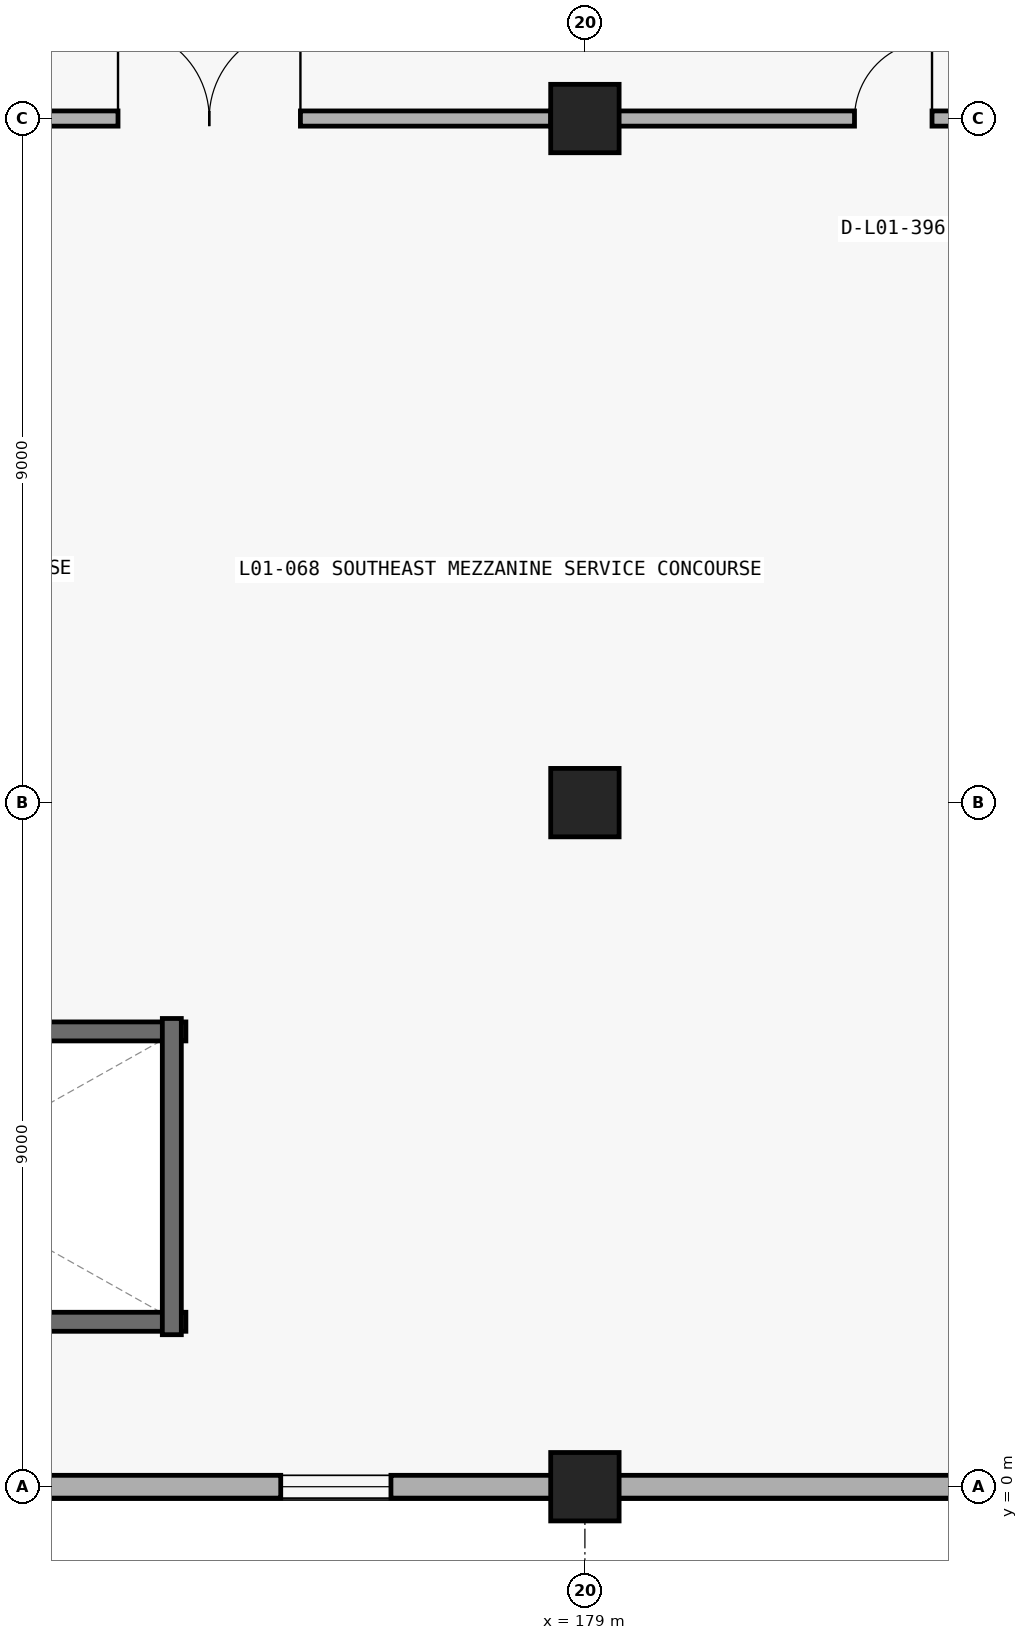
"""IFC4 building model, lengths in metres.
Left out: names, types, materials, properties, quantities, classifications, styles, units other than length and angle.
Written with IfcOpenShell. Run it as: python <this file> out.ifc"""

import sys

from ifc_helpers import new_model, si_unit, direction, frame, frame_2d, origin, origin_2d, place, context, subcontext, project, spatial, rectangle, extrude, element, fill, save


model = new_model("IFC4")
c1 = context("Model", 3, precision=1e-05, world=origin(), true_north=direction((0.0, 1.0)))
c2 = subcontext(c1, "Body", "Model", "MODEL_VIEW")
j1 = project(units=[si_unit("LENGTHUNIT", "METRE"), si_unit("PLANEANGLEUNIT", "RADIAN")], contexts=[c1])
p1 = place(None, origin())
s1 = spatial("IfcSite", under=j1, at=p1, CompositionType="ELEMENT")
p2 = place(p1, origin())
s2 = spatial("IfcBuilding", under=s1, at=p2, CompositionType="ELEMENT")
p3 = place(p2, frame((0.0, 0.0, 5.4)))
s3 = spatial("IfcBuildingStorey", under=s2, at=p3, CompositionType="ELEMENT", Elevation=5.4)
for number, where, z_axis, x_axis in (
    (1, (179.0, 0.0, 0.0), (0.0, 0.0, 1.0), (1.0, 0.0, 0.0)),
    (2, (179.0, 9.0, 0.0), (0.0, 0.0, 1.0), (1.0, 0.0, 0.0)),
    (3, (179.0, 18.0, 0.0), (0.0, 0.0, 1.0), (1.0, 0.0, 0.0)),
):
    element("IfcColumn", number, at=place(p3, frame(where, z_axis=z_axis, x_axis=x_axis)), inside=s3, PredefinedType="COLUMN", context=c2, shape_type="SweptSolid", body=[
        extrude(rectangle(XDim=0.9, YDim=0.9, at=origin_2d()), origin(), (0.0, 0.0, 1.0), 4.8),
    ])
p4 = place(p3, frame((187.575, 0.0, 0.0), z_axis=(0.0, 0.0, 1.0), x_axis=(-1.0, 0.0, 0.0)))
e4 = element("IfcWall", 4, at=p4, inside=s3, PredefinedType="STANDARD", context=c2, shape_type="SweptSolid", body=[
    extrude(rectangle(XDim=8.15, YDim=0.3, at=frame_2d((4.075, 0.0))), origin(), (0.0, 0.0, 1.0), 3.804),
])
p5 = place(p4, frame((2.277, 0.0, 0.95)))
e5 = element("IfcOpeningElement", 5, at=p5, cuts=e4, PredefinedType="OPENING", context=c2, shape_type="SweptSolid", body=[
    extrude(rectangle(XDim=1.15, YDim=1.7, at=frame_2d((0.575, 0.85))), frame((0.0, 0.16, 0.0), z_axis=(0.0, -1.0, 0.0), x_axis=(1.0, 0.0, 0.0)), (0.0, 0.0, 1.0), 0.32),
])
p6 = place(p3, frame((178.575, 0.0, 0.0), z_axis=(0.0, 0.0, 1.0), x_axis=(-1.0, 0.0, 0.0)))
e6 = element("IfcWall", 6, at=p6, inside=s3, PredefinedType="STANDARD", context=c2, shape_type="SweptSolid", body=[
    extrude(rectangle(XDim=8.15, YDim=0.3, at=frame_2d((4.075, 0.0))), origin(), (0.0, 0.0, 1.0), 3.804),
])
p7 = place(p6, frame((2.127, 0.0, 0.95)))
e7 = element("IfcOpeningElement", 7, at=p7, cuts=e6, PredefinedType="OPENING", context=c2, shape_type="SweptSolid", body=[
    extrude(rectangle(XDim=1.45, YDim=1.85, at=frame_2d((0.725, 0.925))), frame((0.0, 0.16, 0.0), z_axis=(0.0, -1.0, 0.0), x_axis=(1.0, 0.0, 0.0)), (0.0, 0.0, 1.0), 0.32),
])
for number, where, z_axis, x_axis in (
    (8, (164.25, 2.17, 0.0), (0.0, 0.0, 1.0), (1.0, 0.0, 0.0)),
    (9, (173.75, 5.99, 0.0), (0.0, 0.0, 1.0), (-1.0, 0.0, 0.0)),
):
    element("IfcWall", number, at=place(p3, frame(where, z_axis=z_axis, x_axis=x_axis)), inside=s3, PredefinedType="SHEAR", context=c2, shape_type="SweptSolid", body=[
        extrude(rectangle(XDim=9.5, YDim=0.25, at=frame_2d((4.75, 0.0))), origin(), (0.0, 0.0, 1.0), 4.52),
    ])
p8 = place(p3, frame((173.565, 2.0, 0.0), z_axis=(0.0, 0.0, 1.0), x_axis=(0.0, 1.0, 0.0)))
e10 = element("IfcWall", 10, at=p8, inside=s3, PredefinedType="SHEAR", context=c2, shape_type="SweptSolid", body=[
    extrude(rectangle(XDim=4.16, YDim=0.25, at=frame_2d((2.08, 0.0))), origin(), (0.0, 0.0, 1.0), 4.52),
])
p9 = place(p3, frame((169.55, 18.0, 0.0), z_axis=(0.0, 0.0, 1.0), x_axis=(1.0, 0.0, 0.0)))
e11 = element("IfcWall", 11, at=p9, inside=s3, PredefinedType="PARTITIONING", context=c2, shape_type="SweptSolid", body=[
    extrude(rectangle(XDim=9.015, YDim=0.2, at=frame_2d((4.507, 0.0))), origin(), (0.0, 0.0, 1.0), 3.804),
])
p10 = place(p9, frame((3.307, 0.0, 0.0)))
e12 = element("IfcOpeningElement", 12, at=p10, cuts=e11, PredefinedType="OPENING", context=c2, shape_type="SweptSolid", body=[
    extrude(rectangle(XDim=2.4, YDim=2.4, at=frame_2d((1.2, 1.2))), frame((0.0, 0.11, 0.0), z_axis=(0.0, -1.0, 0.0), x_axis=(1.0, 0.0, 0.0)), (0.0, 0.0, 1.0), 0.22),
])
p11 = place(p3, frame((178.55, 18.0, 0.0), z_axis=(0.0, 0.0, 1.0), x_axis=(1.0, 0.0, 0.0)))
e13 = element("IfcWall", 13, at=p11, inside=s3, PredefinedType="PARTITIONING", context=c2, shape_type="SweptSolid", body=[
    extrude(rectangle(XDim=9.015, YDim=0.2, at=frame_2d((4.507, 0.0))), origin(), (0.0, 0.0, 1.0), 3.804),
])
p12 = place(p11, frame((3.997, 0.0, 0.0)))
e14 = element("IfcOpeningElement", 14, at=p12, cuts=e13, PredefinedType="OPENING", context=c2, shape_type="SweptSolid", body=[
    extrude(rectangle(XDim=1.02, YDim=2.2, at=frame_2d((0.51, 1.1))), frame((0.0, 0.11, 0.0), z_axis=(0.0, -1.0, 0.0), x_axis=(1.0, 0.0, 0.0)), (0.0, 0.0, 1.0), 0.22),
])
p13 = place(p7, origin())
e15 = element("IfcWindow", 15, at=p13, inside=s3, PartitioningType="SINGLE_PANEL", PredefinedType="WINDOW", context=c2, shape_type="SweptSolid", body=[
    extrude(rectangle(XDim=1.45, YDim=1.85, at=frame_2d((0.725, 0.925))), frame((0.0, 0.03, 0.0), z_axis=(0.0, -1.0, 0.0), x_axis=(1.0, 0.0, 0.0)), (0.0, 0.0, 1.0), 0.06),
])
fill(e7, e15)
p14 = place(p10, origin())
e16 = element("IfcDoor", 16, at=p14, inside=s3, OperationType="DOUBLE_DOOR_SINGLE_SWING", PredefinedType="DOOR", context=c2, shape_type="SweptSolid", body=[
    extrude(rectangle(XDim=2.4, YDim=2.4, at=frame_2d((1.2, 1.2))), frame((0.0, 0.025, 0.0), z_axis=(0.0, -1.0, 0.0), x_axis=(1.0, 0.0, 0.0)), (0.0, 0.0, 1.0), 0.05),
])
fill(e12, e16)
p15 = place(p12, origin())
e17 = element("IfcDoor", 17, at=p15, inside=s3, OperationType="SINGLE_SWING_RIGHT", PredefinedType="DOOR", context=c2, shape_type="SweptSolid", body=[
    extrude(rectangle(XDim=1.02, YDim=2.2, at=frame_2d((0.51, 1.1))), frame((0.0, 0.025, 0.0), z_axis=(0.0, -1.0, 0.0), x_axis=(1.0, 0.0, 0.0)), (0.0, 0.0, 1.0), 0.05),
])
fill(e14, e17)
save(model, sys.argv[1])
